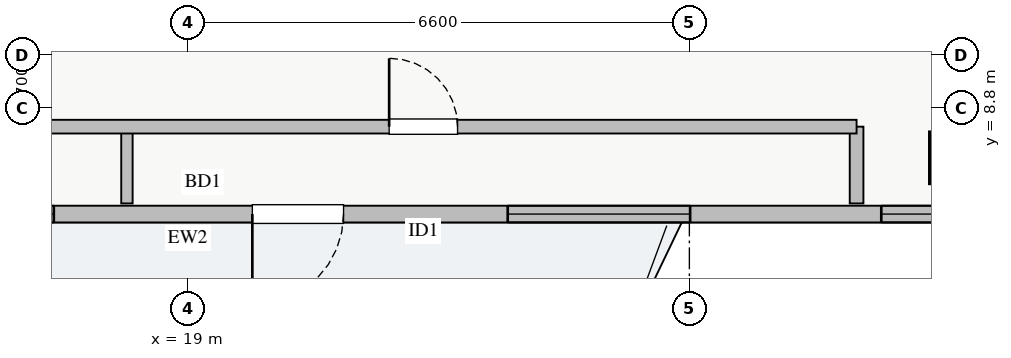
"""IFC4 building model, lengths in metres.
Left out: names, types, materials, properties, quantities, classifications, styles, units other than length and angle.
Written with IfcOpenShell. Run it as: python <this file> out.ifc"""

import sys

from ifc_helpers import new_model, si_unit, direction, frame, frame_2d, origin, origin_2d, place, context, subcontext, project, spatial, rectangle, extrude, source, transform, mapped, element, fill, save


model = new_model("IFC4")
c1 = context("Model", 3, precision=1e-05, world=origin(), true_north=direction((0.0, 1.0)))
c2 = subcontext(c1, "Body", "Model", "MODEL_VIEW")
j1 = project(units=[si_unit("LENGTHUNIT", "METRE"), si_unit("PLANEANGLEUNIT", "RADIAN")], contexts=[c1])
p1 = place(None, origin())
s1 = spatial("IfcSite", under=j1, at=p1, CompositionType="ELEMENT")
p2 = place(p1, origin())
s2 = spatial("IfcBuilding", under=s1, at=p2, CompositionType="ELEMENT")
p3 = place(p2, frame((0.0, 0.0, 247.0)))
s3 = spatial("IfcBuildingStorey", under=s2, at=p3, CompositionType="ELEMENT", Elevation=247.0)
m1 = source(origin(), c2, "Body", "SweptSolid", [
    extrude(rectangle(XDim=0.65, YDim=0.65, at=origin_2d()), origin(), (0.0, 0.0, 1.0), 3.25),
])
p4 = place(p3, frame((29.1, 8.15, 0.0), z_axis=(0.0, 0.0, 1.0), x_axis=(1.0, 0.0, 0.0)))
e1 = element("IfcColumn", 1, at=p4, inside=s3, PredefinedType="COLUMN", context=c2, shape_type="MappedRepresentation", body=[
    mapped(m1, transform((0.0, 0.0, 0.0), x_axis=(1.0, 0.0, 0.0), y_axis=(0.0, 1.0, 0.0), z_axis=(0.0, 0.0, 1.0), scale=1.0)),
])
p5 = place(p3, frame((8.35, 7.41, 0.0), z_axis=(0.0, 0.0, 1.0), x_axis=(1.0, 0.0, 0.0)))
e2 = element("IfcWall", 2, at=p5, inside=s3, PredefinedType="STANDARD", context=c2, shape_type="SweptSolid", body=[
    extrude(rectangle(XDim=21.3, YDim=0.22, at=frame_2d((10.65, 0.0))), origin(), (0.0, 0.0, 1.0), 2.61),
])
p6 = place(p5, frame((11.5, 0.0, 0.0)))
e3 = element("IfcOpeningElement", 3, at=p6, cuts=e2, PredefinedType="OPENING", context=c2, shape_type="SweptSolid", body=[
    extrude(rectangle(XDim=1.2, YDim=2.1, at=frame_2d((0.6, 1.05))), frame((0.0, 0.12, 0.0), z_axis=(0.0, -1.0, 0.0), x_axis=(1.0, 0.0, 0.0)), (0.0, 0.0, 1.0), 0.24),
])
p7 = place(p5, frame((1.463, 0.0, 0.9)))
e4 = element("IfcOpeningElement", 4, at=p7, cuts=e2, PredefinedType="OPENING", context=c2, shape_type="SweptSolid", body=[
    extrude(rectangle(XDim=2.4, YDim=1.48, at=frame_2d((1.2, 0.74))), frame((0.0, 0.12, 0.0), z_axis=(0.0, -1.0, 0.0), x_axis=(1.0, 0.0, 0.0)), (0.0, 0.0, 1.0), 0.24),
])
p8 = place(p5, frame((7.088, 0.0, 0.9)))
e5 = element("IfcOpeningElement", 5, at=p8, cuts=e2, PredefinedType="OPENING", context=c2, shape_type="SweptSolid", body=[
    extrude(rectangle(XDim=1.8, YDim=1.45, at=frame_2d((0.9, 0.725))), frame((0.0, 0.12, 0.0), z_axis=(0.0, -1.0, 0.0), x_axis=(1.0, 0.0, 0.0)), (0.0, 0.0, 1.0), 0.24),
])
p9 = place(p5, frame((19.775, 0.0, 0.9)))
e6 = element("IfcOpeningElement", 6, at=p9, cuts=e2, PredefinedType="OPENING", context=c2, shape_type="SweptSolid", body=[
    extrude(rectangle(XDim=1.2, YDim=1.4, at=frame_2d((0.6, 0.7))), frame((0.0, 0.12, 0.0), z_axis=(0.0, -1.0, 0.0), x_axis=(1.0, 0.0, 0.0)), (0.0, 0.0, 1.0), 0.24),
])
p10 = place(p5, frame((14.86, 0.0, 0.9)))
e7 = element("IfcOpeningElement", 7, at=p10, cuts=e2, PredefinedType="OPENING", context=c2, shape_type="SweptSolid", body=[
    extrude(rectangle(XDim=2.4, YDim=1.5, at=frame_2d((1.2, 0.75))), frame((0.0, 0.12, 0.0), z_axis=(0.0, -1.0, 0.0), x_axis=(1.0, 0.0, 0.0)), (0.0, 0.0, 1.0), 0.24),
])
p11 = place(p3, frame((27.8, 7.55, 0.0), z_axis=(0.0, 0.0, 1.0), x_axis=(0.0, 1.0, 0.0)))
e8 = element("IfcWall", 8, at=p11, inside=s3, PredefinedType="PARTITIONING", context=c2, shape_type="SweptSolid", body=[
    extrude(rectangle(XDim=1.01, YDim=0.18, at=frame_2d((0.505, 0.0))), origin(), (0.0, 0.0, 1.0), 3.07),
])
p12 = place(p3, frame((18.2, 7.55, 0.0), z_axis=(0.0, 0.0, 1.0), x_axis=(0.0, 1.0, 0.0)))
e9 = element("IfcWall", 9, at=p12, inside=s3, PredefinedType="PARTITIONING", context=c2, shape_type="SweptSolid", body=[
    extrude(rectangle(XDim=1.01, YDim=0.15, at=frame_2d((0.505, 0.0))), origin(), (0.0, 0.0, 1.0), 3.07),
])
p13 = place(p3, frame((8.85, 8.56, 0.0), z_axis=(0.0, 0.0, 1.0), x_axis=(1.0, 0.0, 0.0)))
e10 = element("IfcWall", 10, at=p13, inside=s3, PredefinedType="PARTITIONING", context=c2, shape_type="SweptSolid", body=[
    extrude(rectangle(XDim=18.95, YDim=0.18, at=frame_2d((9.475, 0.0))), origin(), (0.0, 0.0, 1.0), 3.07),
])
p14 = place(p13, frame((4.2, 0.0, 0.0)))
e11 = element("IfcOpeningElement", 11, at=p14, cuts=e10, PredefinedType="OPENING", context=c2, shape_type="SweptSolid", body=[
    extrude(rectangle(XDim=0.9, YDim=2.05, at=frame_2d((0.45, 1.025))), frame((0.0, 0.1, 0.0), z_axis=(0.0, -1.0, 0.0), x_axis=(1.0, 0.0, 0.0)), (0.0, 0.0, 1.0), 0.2),
])
p15 = place(p13, frame((12.8, 0.0, 0.0)))
e12 = element("IfcOpeningElement", 12, at=p15, cuts=e10, PredefinedType="OPENING", context=c2, shape_type="SweptSolid", body=[
    extrude(rectangle(XDim=0.9, YDim=2.05, at=frame_2d((0.45, 1.025))), frame((0.0, 0.1, 0.0), z_axis=(0.0, -1.0, 0.0), x_axis=(1.0, 0.0, 0.0)), (0.0, 0.0, 1.0), 0.2),
])
m2 = source(origin(), c2, "Body", "SweptSolid", [
    extrude(rectangle(XDim=1.2, YDim=2.1, at=frame_2d((0.6, 1.05))), frame((0.0, 0.025, 0.0), z_axis=(0.0, -1.0, 0.0), x_axis=(1.0, 0.0, 0.0)), (0.0, 0.0, 1.0), 0.05),
])
p16 = place(p6, frame((1.2, 0.0, 0.0), z_axis=(0.0, 0.0, 1.0), x_axis=(-1.0, 0.0, 0.0)))
e13 = element("IfcDoor", 13, at=p16, inside=s3, OperationType="SINGLE_SWING_LEFT", PredefinedType="DOOR", context=c2, shape_type="MappedRepresentation", body=[
    mapped(m2, transform((0.0, 0.0, 0.0), x_axis=(1.0, 0.0, 0.0), y_axis=(0.0, 1.0, 0.0), z_axis=(0.0, 0.0, 1.0), scale=1.0)),
])
fill(e3, e13)
m3 = source(origin(), c2, "Body", "SweptSolid", [
    extrude(rectangle(XDim=1.8, YDim=1.45, at=frame_2d((0.9, 0.725))), frame((0.0, 0.03, 0.0), z_axis=(0.0, -1.0, 0.0), x_axis=(1.0, 0.0, 0.0)), (0.0, 0.0, 1.0), 0.06),
])
p17 = place(p8, origin())
e14 = element("IfcWindow", 14, at=p17, inside=s3, PartitioningType="DOUBLE_PANEL_VERTICAL", PredefinedType="WINDOW", context=c2, shape_type="MappedRepresentation", body=[
    mapped(m3, transform((0.0, 0.0, 0.0), x_axis=(1.0, 0.0, 0.0), y_axis=(0.0, 1.0, 0.0), z_axis=(0.0, 0.0, 1.0), scale=1.0)),
])
fill(e5, e14)
m4 = source(origin(), c2, "Body", "SweptSolid", [
    extrude(rectangle(XDim=1.2, YDim=1.4, at=frame_2d((0.6, 0.7))), frame((0.0, 0.03, 0.0), z_axis=(0.0, -1.0, 0.0), x_axis=(1.0, 0.0, 0.0)), (0.0, 0.0, 1.0), 0.06),
])
p18 = place(p9, origin())
e15 = element("IfcWindow", 15, at=p18, inside=s3, PartitioningType="TRIPLE_PANEL_VERTICAL", PredefinedType="WINDOW", context=c2, shape_type="MappedRepresentation", body=[
    mapped(m4, transform((0.0, 0.0, 0.0), x_axis=(1.0, 0.0, 0.0), y_axis=(0.0, 1.0, 0.0), z_axis=(0.0, 0.0, 1.0), scale=1.0)),
])
fill(e6, e15)
m5 = source(origin(), c2, "Body", "SweptSolid", [
    extrude(rectangle(XDim=0.9, YDim=2.05, at=frame_2d((0.45, 1.025))), frame((0.0, 0.025, 0.0), z_axis=(0.0, -1.0, 0.0), x_axis=(1.0, 0.0, 0.0)), (0.0, 0.0, 1.0), 0.05),
])
p19 = place(p15, origin())
e16 = element("IfcDoor", 16, at=p19, inside=s3, OperationType="SINGLE_SWING_LEFT", PredefinedType="DOOR", context=c2, shape_type="MappedRepresentation", body=[
    mapped(m5, transform((0.0, 0.0, 0.0), x_axis=(1.0, 0.0, 0.0), y_axis=(0.0, 1.0, 0.0), z_axis=(0.0, 0.0, 1.0), scale=1.0)),
])
fill(e12, e16)
m6 = source(origin(), c2, "Body", "SweptSolid", [
    extrude(rectangle(XDim=2.4, YDim=1.5, at=frame_2d((1.2, 0.75))), frame((0.0, 0.03, 0.0), z_axis=(0.0, -1.0, 0.0), x_axis=(1.0, 0.0, 0.0)), (0.0, 0.0, 1.0), 0.06),
])
p20 = place(p10, origin())
e17 = element("IfcWindow", 17, at=p20, inside=s3, PartitioningType="TRIPLE_PANEL_VERTICAL", PredefinedType="WINDOW", context=c2, shape_type="MappedRepresentation", body=[
    mapped(m6, transform((0.0, 0.0, 0.0), x_axis=(1.0, 0.0, 0.0), y_axis=(0.0, 1.0, 0.0), z_axis=(0.0, 0.0, 1.0), scale=1.0)),
])
fill(e7, e17)
save(model, sys.argv[1])
